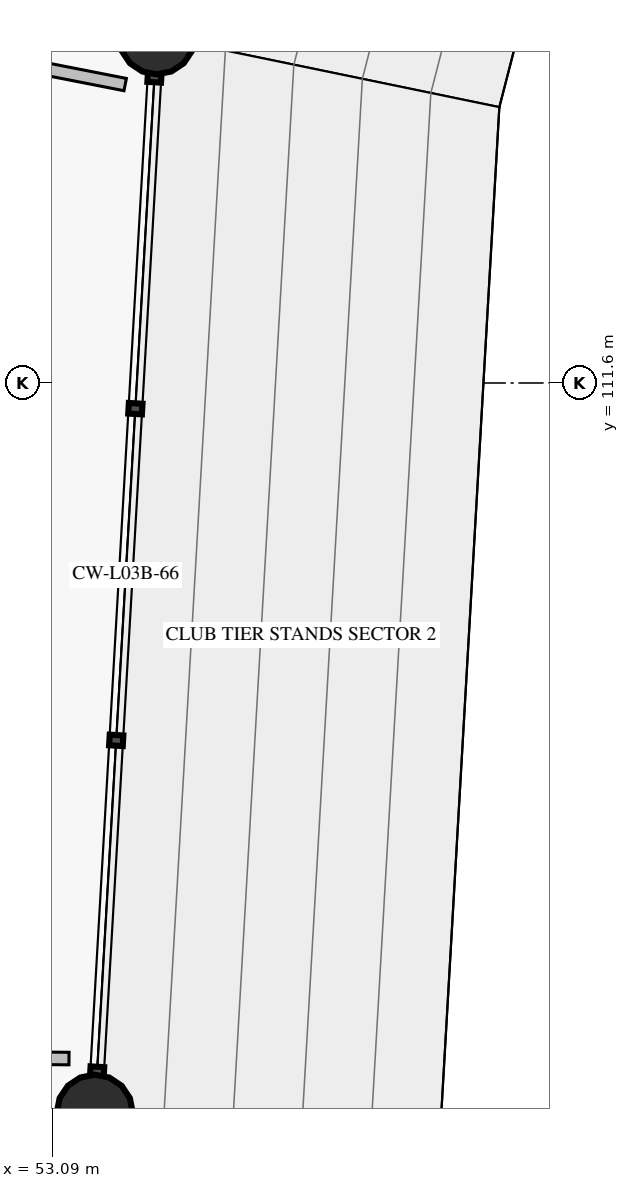
"""IFC4 building model, lengths in metres.
Left out: names, types, materials, properties, quantities, classifications, styles, units other than length and angle.
Written with IfcOpenShell. Run it as: python <this file> out.ifc"""

import sys

from ifc_helpers import new_model, si_unit, direction, frame, frame_2d, origin, origin_2d, place, context, subcontext, project, spatial, rectangle, circle, extrude, element, save


model = new_model("IFC4")
c1 = context("Model", 3, precision=1e-05, world=origin(), true_north=direction((0.0, 1.0)))
c2 = subcontext(c1, "Body", "Model", "MODEL_VIEW")
j1 = project(units=[si_unit("LENGTHUNIT", "METRE"), si_unit("PLANEANGLEUNIT", "RADIAN")], contexts=[c1])
p1 = place(None, origin())
s1 = spatial("IfcSite", under=j1, at=p1, CompositionType="ELEMENT")
p2 = place(p1, origin())
s2 = spatial("IfcBuilding", under=s1, at=p2, CompositionType="ELEMENT")
p3 = place(p2, frame((0.0, 0.0, 15.64)))
s3 = spatial("IfcBuildingStorey", under=s2, at=p3, CompositionType="ELEMENT", Elevation=15.64)
for number, where, z_axis, x_axis in (
    (1, (54.467, 116.16, 0.0), (0.0, 0.0, 1.0), (-0.975, 0.223, 0.0)),
    (2, (53.65, 102.0, 0.0), (0.0, 0.0, 1.0), (-1.0, 0.0, 0.0)),
):
    element("IfcColumn", number, at=place(p3, frame(where, z_axis=z_axis, x_axis=x_axis)), inside=s3, PredefinedType="COLUMN", context=c2, shape_type="SweptSolid", body=[
        extrude(circle(Radius=0.5, at=origin_2d()), origin(), (0.0, 0.0, 1.0), 4.76),
    ])
p4 = place(p3, frame((48.32, 116.65, 0.0), z_axis=(0.0, 0.0, 1.0), x_axis=(0.981299196532, -0.192488666901, 0.0)))
e3 = element("IfcWall", 3, at=p4, inside=s3, PredefinedType="PARTITIONING", context=c2, shape_type="SweptSolid", body=[
    extrude(rectangle(XDim=5.839, YDim=0.165, at=frame_2d((2.92, 0.0))), origin(), (0.0, 0.0, 1.0), 3.78),
])
p5 = place(p3, frame((47.52, 102.771, 0.0), z_axis=(0.0, 0.0, 1.0), x_axis=(0.999947968753, -0.01020096992, 0.0)))
e4 = element("IfcWall", 4, at=p5, inside=s3, PredefinedType="PARTITIONING", context=c2, shape_type="SweptSolid", body=[
    extrude(rectangle(XDim=5.792, YDim=0.165, at=frame_2d((2.896, 0.0))), origin(), (0.0, 0.0, 1.0), 3.78),
])
save(model, sys.argv[1])
